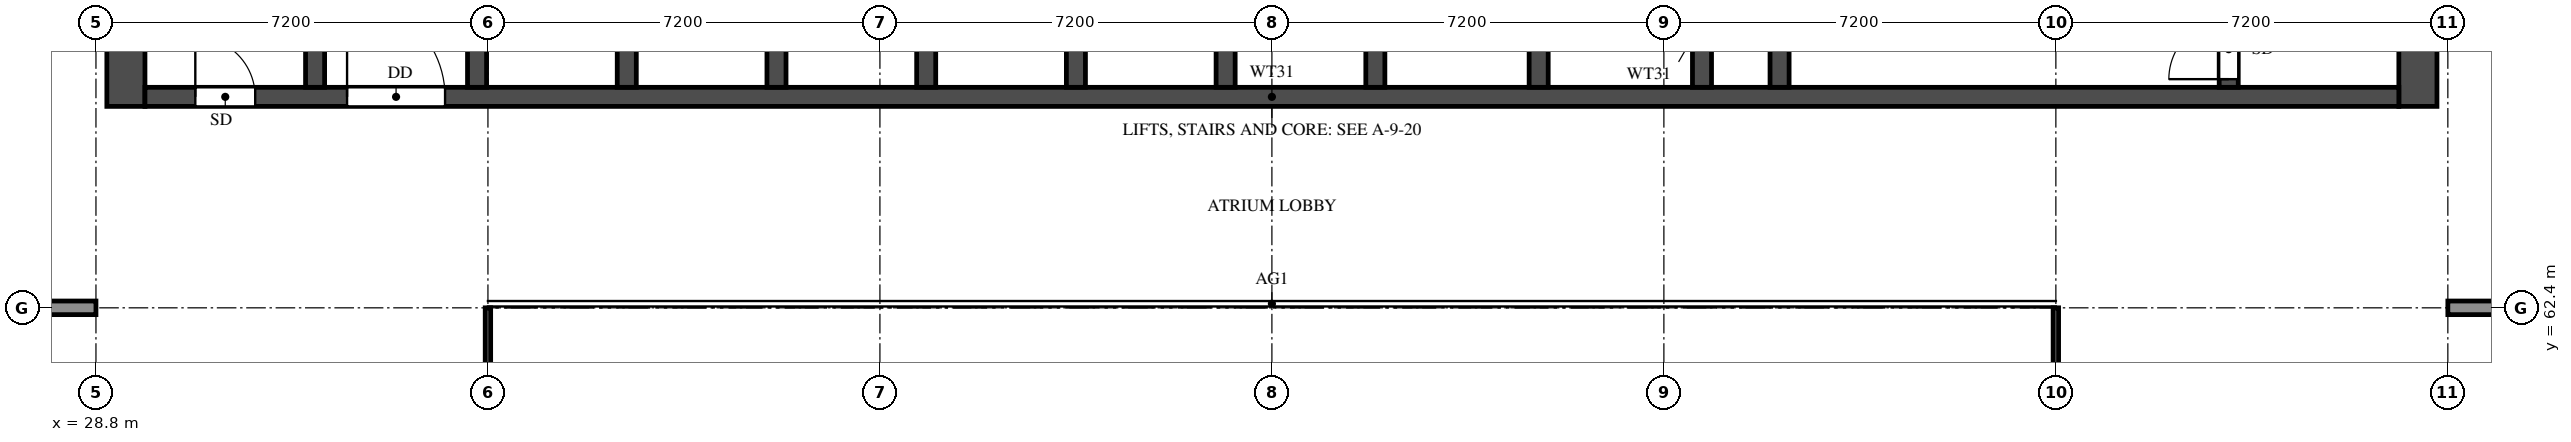
"""IFC4 building model, lengths in metres.
Left out: names, types, materials, properties, quantities, classifications, styles, units other than length and angle.
Written with IfcOpenShell. Run it as: python <this file> out.ifc"""

import sys

from ifc_helpers import new_model, si_unit, direction, frame, frame_2d, origin, place, context, subcontext, project, spatial, rectangle, extrude, element, fill, save


model = new_model("IFC4")
c1 = context("Model", 3, precision=1e-05, world=origin(), true_north=direction((0.0, 1.0)))
c2 = subcontext(c1, "Body", "Model", "MODEL_VIEW")
j1 = project(units=[si_unit("LENGTHUNIT", "METRE"), si_unit("PLANEANGLEUNIT", "RADIAN")], contexts=[c1])
p1 = place(None, origin())
s1 = spatial("IfcSite", under=j1, at=p1, CompositionType="ELEMENT")
p2 = place(p1, origin())
s2 = spatial("IfcBuilding", under=s1, at=p2, CompositionType="ELEMENT")
p3 = place(p2, frame((0.0, 0.0, 137.5)))
s3 = spatial("IfcBuildingStorey", under=s2, at=p3, CompositionType="ELEMENT", Elevation=137.5)
for number, where, z_axis, x_axis in (
    (1, (29.35, 66.1, 0.0), (0.0, 0.0, 1.0), (0.0, 1.0, 0.0)),
    (2, (71.45, 66.1, 0.0), (0.0, 0.0, 1.0), (0.0, 1.0, 0.0)),
):
    element("IfcWall", number, at=place(p3, frame(where, z_axis=z_axis, x_axis=x_axis)), inside=s3, PredefinedType="SHEAR", context=c2, shape_type="SweptSolid", body=[
        extrude(rectangle(XDim=11.9, YDim=0.7, at=frame_2d((5.95, 0.0))), origin(), (0.0, 0.0, 1.0), 5.2),
    ])
p4 = place(p3, frame((29.7, 66.275, 0.0), z_axis=(0.0, 0.0, 1.0), x_axis=(1.0, 0.0, 0.0)))
e3 = element("IfcWall", 3, at=p4, inside=s3, PredefinedType="SHEAR", context=c2, shape_type="SweptSolid", body=[
    extrude(rectangle(XDim=41.4, YDim=0.35, at=frame_2d((20.7, 0.0))), origin(), (0.0, 0.0, 1.0), 5.2),
])
p5 = place(p4, frame((0.925, 0.0, 0.0)))
e4 = element("IfcOpeningElement", 4, at=p5, cuts=e3, PredefinedType="OPENING", context=c2, shape_type="SweptSolid", body=[
    extrude(rectangle(XDim=1.1, YDim=2.1, at=frame_2d((0.55, 1.05))), frame((0.0, 0.185, 0.0), z_axis=(0.0, -1.0, 0.0), x_axis=(1.0, 0.0, 0.0)), (0.0, 0.0, 1.0), 0.37),
])
p6 = place(p4, frame((3.712, 0.0, 0.0)))
e5 = element("IfcOpeningElement", 5, at=p6, cuts=e3, PredefinedType="OPENING", context=c2, shape_type="SweptSolid", body=[
    extrude(rectangle(XDim=1.8, YDim=2.1, at=frame_2d((0.9, 1.05))), frame((0.0, 0.185, 0.0), z_axis=(0.0, -1.0, 0.0), x_axis=(1.0, 0.0, 0.0)), (0.0, 0.0, 1.0), 0.37),
])
p7 = place(p3, frame((32.825, 66.45, 0.0), z_axis=(0.0, 0.0, 1.0), x_axis=(0.0, 1.0, 0.0)))
e6 = element("IfcWall", 6, at=p7, inside=s3, PredefinedType="SHEAR", context=c2, shape_type="SweptSolid", body=[
    extrude(rectangle(XDim=10.85, YDim=0.35, at=frame_2d((5.425, 0.0))), origin(), (0.0, 0.0, 1.0), 5.2),
])
p8 = place(p3, frame((67.975, 66.45, 0.0), z_axis=(0.0, 0.0, 1.0), x_axis=(0.0, 1.0, 0.0)))
e7 = element("IfcWall", 7, at=p8, inside=s3, PredefinedType="SHEAR", context=c2, shape_type="SweptSolid", body=[
    extrude(rectangle(XDim=10.85, YDim=0.35, at=frame_2d((5.425, 0.0))), origin(), (0.0, 0.0, 1.0), 5.2),
])
p9 = place(p8, frame((0.15, 0.0, 0.0)))
e8 = element("IfcOpeningElement", 8, at=p9, cuts=e7, PredefinedType="OPENING", context=c2, shape_type="SweptSolid", body=[
    extrude(rectangle(XDim=1.1, YDim=2.1, at=frame_2d((0.55, 1.05))), frame((0.0, 0.185, 0.0), z_axis=(0.0, -1.0, 0.0), x_axis=(1.0, 0.0, 0.0)), (0.0, 0.0, 1.0), 0.37),
])
p10 = place(p3, frame((59.725, 66.45, 0.0), z_axis=(0.0, 0.0, 1.0), x_axis=(0.0, 1.0, 0.0)))
e9 = element("IfcWall", 9, at=p10, inside=s3, PredefinedType="SHEAR", context=c2, shape_type="SweptSolid", body=[
    extrude(rectangle(XDim=6.125, YDim=0.35, at=frame_2d((3.062, 0.0))), origin(), (0.0, 0.0, 1.0), 5.2),
])
p11 = place(p10, frame((3.85, 0.0, 0.0)))
e10 = element("IfcOpeningElement", 10, at=p11, cuts=e9, PredefinedType="OPENING", context=c2, shape_type="SweptSolid", body=[
    extrude(rectangle(XDim=1.2, YDim=2.1, at=frame_2d((0.6, 1.05))), frame((0.0, 0.185, 0.0), z_axis=(0.0, -1.0, 0.0), x_axis=(1.0, 0.0, 0.0)), (0.0, 0.0, 1.0), 0.37),
])
for number, where, z_axis, x_axis in (
    (11, (35.8, 66.45, 0.0), (0.0, 0.0, 1.0), (0.0, 1.0, 0.0)),
    (12, (38.55, 66.45, 0.0), (0.0, 0.0, 1.0), (0.0, 1.0, 0.0)),
    (13, (41.3, 66.45, 0.0), (0.0, 0.0, 1.0), (0.0, 1.0, 0.0)),
    (14, (44.05, 66.45, 0.0), (0.0, 0.0, 1.0), (0.0, 1.0, 0.0)),
    (15, (46.8, 66.45, 0.0), (0.0, 0.0, 1.0), (0.0, 1.0, 0.0)),
    (16, (49.55, 66.45, 0.0), (0.0, 0.0, 1.0), (0.0, 1.0, 0.0)),
    (17, (52.3, 66.45, 0.0), (0.0, 0.0, 1.0), (0.0, 1.0, 0.0)),
    (18, (55.3, 66.45, 0.0), (0.0, 0.0, 1.0), (0.0, 1.0, 0.0)),
    (19, (58.3, 66.45, 0.0), (0.0, 0.0, 1.0), (0.0, 1.0, 0.0)),
):
    element("IfcWall", number, at=place(p3, frame(where, z_axis=z_axis, x_axis=x_axis)), inside=s3, PredefinedType="SHEAR", context=c2, shape_type="SweptSolid", body=[
        extrude(rectangle(XDim=2.425, YDim=0.35, at=frame_2d((1.212, 0.0))), origin(), (0.0, 0.0, 1.0), 5.2),
    ])
p12 = place(p3, frame((14.57, 62.4, 0.0), z_axis=(0.0, 0.0, 1.0), x_axis=(1.0, 0.0, 0.0)))
e20 = element("IfcWall", 20, at=p12, inside=s3, PredefinedType="SOLIDWALL", context=c2, shape_type="SweptSolid", body=[
    extrude(rectangle(XDim=14.23, YDim=0.25, at=frame_2d((7.115, 0.0))), origin(), (0.0, 0.0, 1.0), 5.2),
])
p13 = place(p12, frame((5.23, 0.0, 0.0)))
e21 = element("IfcOpeningElement", 21, at=p13, cuts=e20, PredefinedType="OPENING", context=c2, shape_type="SweptSolid", body=[
    extrude(rectangle(XDim=1.1, YDim=2.1, at=frame_2d((0.55, 1.05))), frame((0.0, 0.135, 0.0), z_axis=(0.0, -1.0, 0.0), x_axis=(1.0, 0.0, 0.0)), (0.0, 0.0, 1.0), 0.27),
])
p14 = place(p3, frame((72.0, 62.4, 0.0), z_axis=(0.0, 0.0, 1.0), x_axis=(1.0, 0.0, 0.0)))
e22 = element("IfcWall", 22, at=p14, inside=s3, PredefinedType="SOLIDWALL", context=c2, shape_type="SweptSolid", body=[
    extrude(rectangle(XDim=14.23, YDim=0.25, at=frame_2d((7.115, 0.0))), origin(), (0.0, 0.0, 1.0), 5.2),
])
p15 = place(p14, frame((5.4, 0.0, 0.0)))
e23 = element("IfcOpeningElement", 23, at=p15, cuts=e22, PredefinedType="OPENING", context=c2, shape_type="SweptSolid", body=[
    extrude(rectangle(XDim=1.1, YDim=2.1, at=frame_2d((0.55, 1.05))), frame((0.0, 0.135, 0.0), z_axis=(0.0, -1.0, 0.0), x_axis=(1.0, 0.0, 0.0)), (0.0, 0.0, 1.0), 0.27),
])
for number, where, z_axis, x_axis in (
    (24, (36.0, 48.0, 0.0), (0.0, 0.0, 1.0), (0.0, 1.0, 0.0)),
    (25, (64.8, 48.0, 0.0), (0.0, 0.0, 1.0), (0.0, 1.0, 0.0)),
):
    element("IfcWall", number, at=place(p3, frame(where, z_axis=z_axis, x_axis=x_axis)), inside=s3, PredefinedType="PARTITIONING", context=c2, shape_type="SweptSolid", body=[
        extrude(rectangle(XDim=14.4, YDim=0.1, at=frame_2d((7.2, 0.0))), origin(), (0.0, 0.0, 1.0), 4.3),
    ])
p16 = place(p5, origin())
e26 = element("IfcDoor", 26, at=p16, inside=s3, OperationType="SINGLE_SWING_LEFT", PredefinedType="DOOR", context=c2, shape_type="SweptSolid", body=[
    extrude(rectangle(XDim=1.1, YDim=2.1, at=frame_2d((0.55, 1.05))), frame((0.0, 0.025, 0.0), z_axis=(0.0, -1.0, 0.0), x_axis=(1.0, 0.0, 0.0)), (0.0, 0.0, 1.0), 0.05),
])
fill(e4, e26)
p17 = place(p9, origin())
e27 = element("IfcDoor", 27, at=p17, inside=s3, OperationType="SINGLE_SWING_LEFT", PredefinedType="DOOR", context=c2, shape_type="SweptSolid", body=[
    extrude(rectangle(XDim=1.1, YDim=2.1, at=frame_2d((0.55, 1.05))), frame((0.0, 0.025, 0.0), z_axis=(0.0, -1.0, 0.0), x_axis=(1.0, 0.0, 0.0)), (0.0, 0.0, 1.0), 0.05),
])
fill(e8, e27)
p18 = place(p6, origin())
e28 = element("IfcDoor", 28, at=p18, inside=s3, OperationType="DOUBLE_DOOR_SINGLE_SWING", PredefinedType="DOOR", context=c2, shape_type="SweptSolid", body=[
    extrude(rectangle(XDim=1.8, YDim=2.1, at=frame_2d((0.9, 1.05))), frame((0.0, 0.025, 0.0), z_axis=(0.0, -1.0, 0.0), x_axis=(1.0, 0.0, 0.0)), (0.0, 0.0, 1.0), 0.05),
])
fill(e5, e28)
save(model, sys.argv[1])
